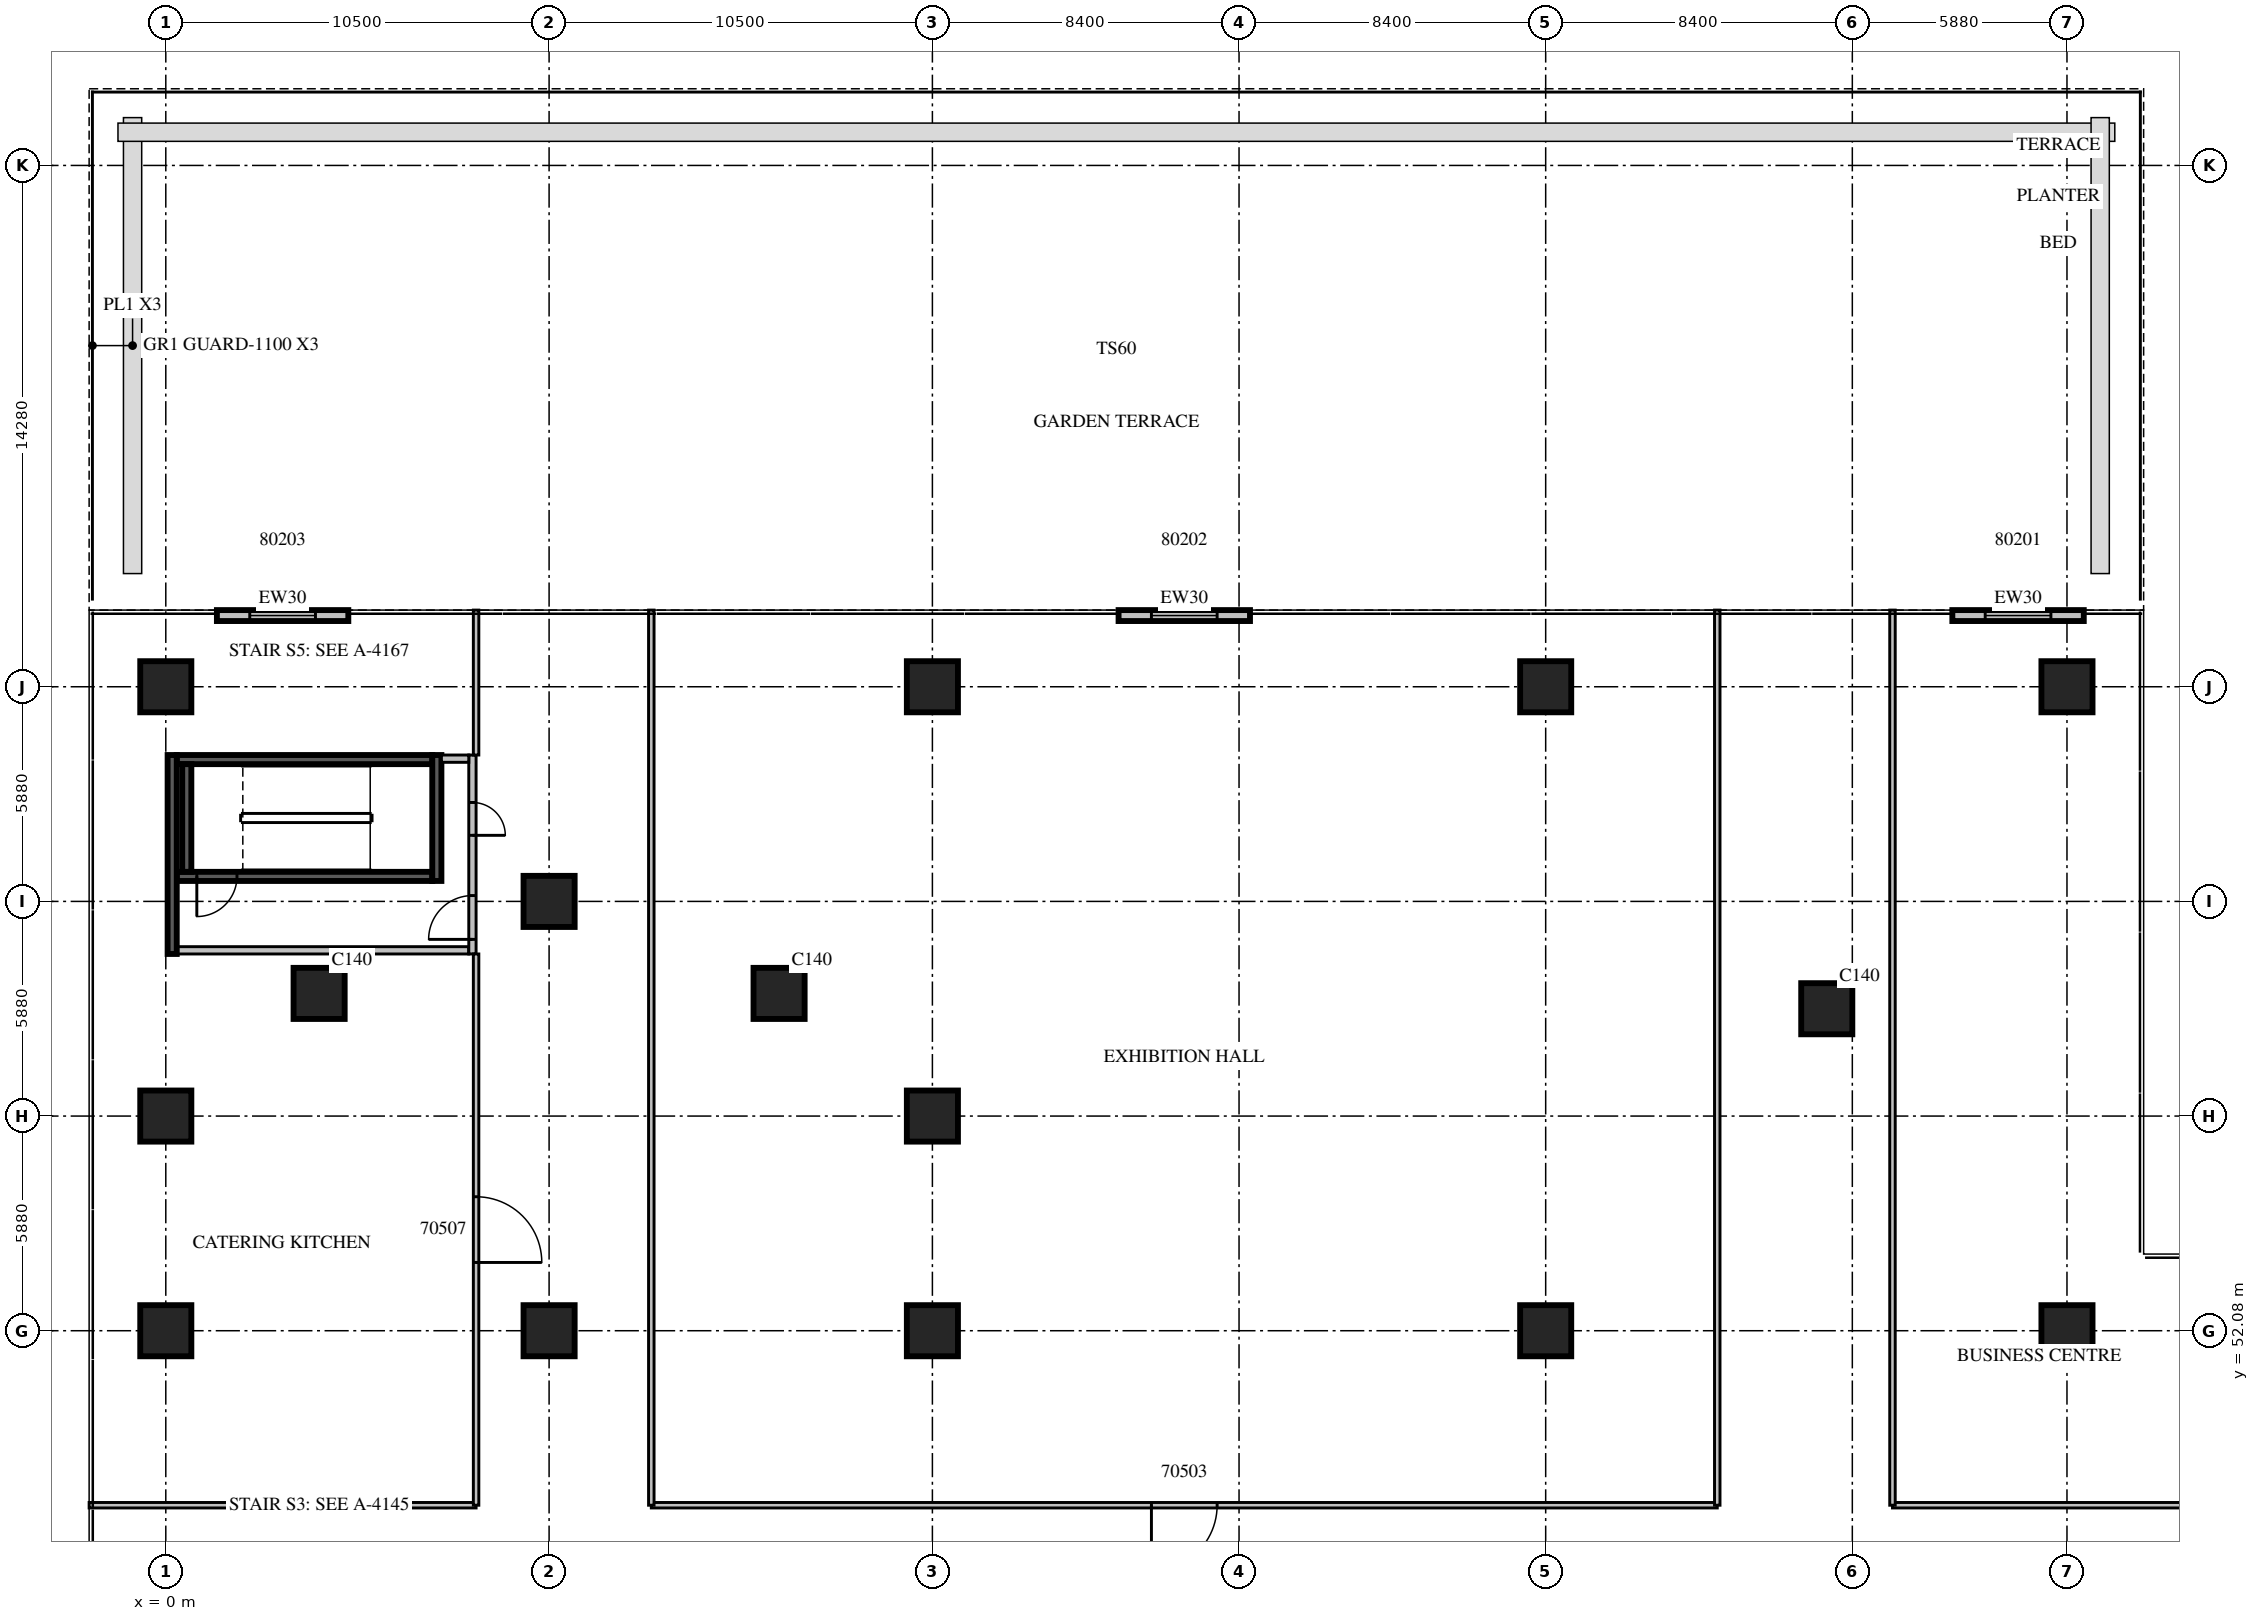
"""IFC4 building model, lengths in metres.
Left out: names, types, materials, properties, quantities, classifications, styles, units other than length and angle.
Written with IfcOpenShell. Run it as: python <this file> out.ifc"""

import sys

from ifc_helpers import new_model, si_unit, direction, frame, frame_2d, origin, origin_2d, place, context, subcontext, project, spatial, rectangle, extrude, source, transform, mapped, element, fill, save


model = new_model("IFC4")
c1 = context("Model", 3, precision=1e-05, world=origin(), true_north=direction((0.0, 1.0)))
c2 = subcontext(c1, "Body", "Model", "MODEL_VIEW")
j1 = project(units=[si_unit("LENGTHUNIT", "METRE"), si_unit("PLANEANGLEUNIT", "RADIAN")], contexts=[c1])
p1 = place(None, origin())
s1 = spatial("IfcSite", under=j1, at=p1, CompositionType="ELEMENT")
p2 = place(p1, origin())
s2 = spatial("IfcBuilding", under=s1, at=p2, CompositionType="ELEMENT")
p3 = place(p2, frame((0.0, 0.0, 12.9)))
s3 = spatial("IfcBuildingStorey", under=s2, at=p3, CompositionType="ELEMENT", Elevation=12.9)
m1 = source(origin(), c2, "Body", "SweptSolid", [
    extrude(rectangle(XDim=1.4, YDim=1.4, at=origin_2d()), origin(), (0.0, 0.0, 1.0), 5.4),
])
for number, where, z_axis, x_axis in (
    (1, (0.0, 52.08, 0.0), (0.0, 0.0, 1.0), (1.0, 0.0, 0.0)),
    (2, (0.0, 57.96, 0.0), (0.0, 0.0, 1.0), (1.0, 0.0, 0.0)),
    (3, (0.0, 69.72, 0.0), (0.0, 0.0, 1.0), (1.0, 0.0, 0.0)),
    (4, (4.2, 61.32, 0.0), (0.0, 0.0, 1.0), (1.0, 0.0, 0.0)),
    (5, (10.5, 52.08, 0.0), (0.0, 0.0, 1.0), (1.0, 0.0, 0.0)),
    (6, (10.5, 63.84, 0.0), (0.0, 0.0, 1.0), (1.0, 0.0, 0.0)),
    (7, (16.8, 61.32, 0.0), (0.0, 0.0, 1.0), (1.0, 0.0, 0.0)),
    (8, (21.0, 52.08, 0.0), (0.0, 0.0, 1.0), (1.0, 0.0, 0.0)),
    (9, (21.0, 57.96, 0.0), (0.0, 0.0, 1.0), (1.0, 0.0, 0.0)),
    (10, (21.0, 69.72, 0.0), (0.0, 0.0, 1.0), (1.0, 0.0, 0.0)),
    (11, (37.8, 52.08, 0.0), (0.0, 0.0, 1.0), (1.0, 0.0, 0.0)),
    (12, (37.8, 69.72, 0.0), (0.0, 0.0, 1.0), (1.0, 0.0, 0.0)),
    (13, (45.5, 60.9, 0.0), (0.0, 0.0, 1.0), (1.0, 0.0, 0.0)),
    (14, (52.08, 52.08, 0.0), (0.0, 0.0, 1.0), (1.0, 0.0, 0.0)),
    (15, (52.08, 69.72, 0.0), (0.0, 0.0, 1.0), (1.0, 0.0, 0.0)),
):
    element("IfcColumn", number, at=place(p3, frame(where, z_axis=z_axis, x_axis=x_axis)), inside=s3, PredefinedType="COLUMN", context=c2, shape_type="MappedRepresentation", body=[
        mapped(m1, transform((0.0, 0.0, 0.0), scale=1.0)),
    ])
p4 = place(p3, frame((52.54, 71.67, 0.0), z_axis=(0.0, 0.0, 1.0), x_axis=(-1.0, 0.0, 0.0)))
e16 = element("IfcWall", 16, at=p4, inside=s3, PredefinedType="STANDARD", context=c2, shape_type="SweptSolid", body=[
    extrude(rectangle(XDim=3.6, YDim=0.3, at=frame_2d((1.8, 0.0))), origin(), (0.0, 0.0, 1.0), 4.8),
])
m2 = source(origin(), c2, "Body", "SweptSolid", [
    extrude(rectangle(XDim=1.8, YDim=2.4, at=frame_2d((0.9, 1.2))), frame((0.0, 0.16, 0.0), z_axis=(0.0, -1.0, 0.0), x_axis=(1.0, 0.0, 0.0)), (0.0, 0.0, 1.0), 0.32),
])
p5 = place(p4, frame((0.9, 0.0, 0.0)))
e17 = element("IfcOpeningElement", 17, at=p5, cuts=e16, PredefinedType="OPENING", context=c2, shape_type="MappedRepresentation", body=[
    mapped(m2, transform((0.0, 0.0, 0.0), scale=1.0)),
])
m3 = source(origin(), c2, "Body", "SweptSolid", [
    extrude(rectangle(XDim=3.6, YDim=0.3, at=frame_2d((1.8, 0.0))), origin(), (0.0, 0.0, 1.0), 4.8),
])
p6 = place(p3, frame((29.7, 71.67, 0.0), z_axis=(0.0, 0.0, 1.0), x_axis=(-1.0, 0.0, 0.0)))
e18 = element("IfcWall", 18, at=p6, inside=s3, PredefinedType="STANDARD", context=c2, shape_type="MappedRepresentation", body=[
    mapped(m3, transform((0.0, 0.0, 0.0), scale=1.0)),
])
p7 = place(p6, frame((0.9, 0.0, 0.0)))
e19 = element("IfcOpeningElement", 19, at=p7, cuts=e18, PredefinedType="OPENING", context=c2, shape_type="MappedRepresentation", body=[
    mapped(m2, transform((0.0, 0.0, 0.0), scale=1.0)),
])
p8 = place(p3, frame((5.0, 71.67, 0.0), z_axis=(0.0, 0.0, 1.0), x_axis=(-1.0, 0.0, 0.0)))
e20 = element("IfcWall", 20, at=p8, inside=s3, PredefinedType="STANDARD", context=c2, shape_type="MappedRepresentation", body=[
    mapped(m3, transform((0.0, 0.0, 0.0), scale=1.0)),
])
p9 = place(p8, frame((0.9, 0.0, 0.0)))
e21 = element("IfcOpeningElement", 21, at=p9, cuts=e20, PredefinedType="OPENING", context=c2, shape_type="MappedRepresentation", body=[
    mapped(m2, transform((0.0, 0.0, 0.0), scale=1.0)),
])
m4 = source(origin(), c2, "Body", "SweptSolid", [
    extrude(rectangle(XDim=7.0, YDim=0.25, at=frame_2d((3.5, 0.0))), origin(), (0.0, 0.0, 1.0), 4.8),
])
p10 = place(p3, frame((0.3, 64.525, 0.0), z_axis=(0.0, 0.0, 1.0), x_axis=(1.0, 0.0, 0.0)))
e22 = element("IfcWall", 22, at=p10, inside=s3, PredefinedType="SOLIDWALL", context=c2, shape_type="MappedRepresentation", body=[
    mapped(m4, transform((0.0, 0.0, 0.0), scale=1.0)),
])
m5 = source(origin(), c2, "Body", "SweptSolid", [
    extrude(rectangle(XDim=1.1, YDim=2.1, at=frame_2d((0.55, 1.05))), frame((0.0, 0.135, 0.0), z_axis=(0.0, -1.0, 0.0), x_axis=(1.0, 0.0, 0.0)), (0.0, 0.0, 1.0), 0.27),
])
p11 = place(p10, frame((0.55, 0.0, 0.0)))
e23 = element("IfcOpeningElement", 23, at=p11, cuts=e22, PredefinedType="OPENING", context=c2, shape_type="MappedRepresentation", body=[
    mapped(m5, transform((0.0, 0.0, 0.0), scale=1.0)),
])
p12 = place(p3, frame((0.3, 67.725, 0.0), z_axis=(0.0, 0.0, 1.0), x_axis=(1.0, 0.0, 0.0)))
e24 = element("IfcWall", 24, at=p12, inside=s3, PredefinedType="SOLIDWALL", context=c2, shape_type="MappedRepresentation", body=[
    mapped(m4, transform((0.0, 0.0, 0.0), scale=1.0)),
])
m6 = source(origin(), c2, "Body", "SweptSolid", [
    extrude(rectangle(XDim=3.45, YDim=0.25, at=frame_2d((1.725, 0.0))), origin(), (0.0, 0.0, 1.0), 4.8),
])
p13 = place(p3, frame((7.425, 64.4, 0.0), z_axis=(0.0, 0.0, 1.0), x_axis=(0.0, 1.0, 0.0)))
e25 = element("IfcWall", 25, at=p13, inside=s3, PredefinedType="SOLIDWALL", context=c2, shape_type="MappedRepresentation", body=[
    mapped(m6, transform((0.0, 0.0, 0.0), scale=1.0)),
])
m7 = source(origin(), c2, "Body", "SweptSolid", [
    extrude(rectangle(XDim=2.95, YDim=0.25, at=frame_2d((1.475, 0.0))), origin(), (0.0, 0.0, 1.0), 4.8),
])
p14 = place(p3, frame((0.575, 64.65, 0.0), z_axis=(0.0, 0.0, 1.0), x_axis=(0.0, 1.0, 0.0)))
e26 = element("IfcWall", 26, at=p14, inside=s3, PredefinedType="SOLIDWALL", context=c2, shape_type="MappedRepresentation", body=[
    mapped(m7, transform((0.0, 0.0, 0.0), scale=1.0)),
])
m8 = source(origin(), c2, "Body", "SweptSolid", [
    extrude(rectangle(XDim=8.0, YDim=0.2, at=frame_2d((4.0, 0.0))), origin(), (0.0, 0.0, 1.0), 4.8),
])
p15 = place(p3, frame((0.3, 62.5, 0.0), z_axis=(0.0, 0.0, 1.0), x_axis=(1.0, 0.0, 0.0)))
e27 = element("IfcWall", 27, at=p15, inside=s3, PredefinedType="PARTITIONING", context=c2, shape_type="MappedRepresentation", body=[
    mapped(m8, transform((0.0, 0.0, 0.0), scale=1.0)),
])
m9 = source(origin(), c2, "Body", "SweptSolid", [
    extrude(rectangle(XDim=5.45, YDim=0.2, at=frame_2d((2.725, 0.0))), origin(), (0.0, 0.0, 1.0), 4.8),
])
p16 = place(p3, frame((8.4, 62.4, 0.0), z_axis=(0.0, 0.0, 1.0), x_axis=(0.0, 1.0, 0.0)))
e28 = element("IfcWall", 28, at=p16, inside=s3, PredefinedType="PARTITIONING", context=c2, shape_type="MappedRepresentation", body=[
    mapped(m9, transform((0.0, 0.0, 0.0), scale=1.0)),
])
m10 = source(origin(), c2, "Body", "SweptSolid", [
    extrude(rectangle(XDim=1.2, YDim=2.1, at=frame_2d((0.6, 1.05))), frame((0.0, 0.11, 0.0), z_axis=(0.0, -1.0, 0.0), x_axis=(1.0, 0.0, 0.0)), (0.0, 0.0, 1.0), 0.22),
])
p17 = place(p16, frame((0.4, 0.0, 0.0)))
e29 = element("IfcOpeningElement", 29, at=p17, cuts=e28, PredefinedType="OPENING", context=c2, shape_type="MappedRepresentation", body=[
    mapped(m10, transform((0.0, 0.0, 0.0), scale=1.0)),
])
m11 = source(origin(), c2, "Body", "SweptSolid", [
    extrude(rectangle(XDim=0.9, YDim=2.1, at=frame_2d((0.45, 1.05))), frame((0.0, 0.11, 0.0), z_axis=(0.0, -1.0, 0.0), x_axis=(1.0, 0.0, 0.0)), (0.0, 0.0, 1.0), 0.22),
])
p18 = place(p16, frame((3.25, 0.0, 0.0)))
e30 = element("IfcOpeningElement", 30, at=p18, cuts=e28, PredefinedType="OPENING", context=c2, shape_type="MappedRepresentation", body=[
    mapped(m11, transform((0.0, 0.0, 0.0), scale=1.0)),
])
m12 = source(origin(), c2, "Body", "SweptSolid", [
    extrude(rectangle(XDim=0.75, YDim=0.2, at=frame_2d((0.375, 0.0))), origin(), (0.0, 0.0, 1.0), 4.8),
])
p19 = place(p3, frame((7.55, 67.75, 0.0), z_axis=(0.0, 0.0, 1.0), x_axis=(1.0, 0.0, 0.0)))
e31 = element("IfcWall", 31, at=p19, inside=s3, PredefinedType="PARTITIONING", context=c2, shape_type="MappedRepresentation", body=[
    mapped(m12, transform((0.0, 0.0, 0.0), scale=1.0)),
])
m13 = source(origin(), c2, "Body", "SweptSolid", [
    extrude(rectangle(XDim=5.45, YDim=0.25, at=frame_2d((2.725, 0.0))), origin(), (0.0, 0.0, 1.0), 4.8),
])
p20 = place(p3, frame((0.175, 62.4, 0.0), z_axis=(0.0, 0.0, 1.0), x_axis=(0.0, 1.0, 0.0)))
e32 = element("IfcWall", 32, at=p20, inside=s3, PredefinedType="SOLIDWALL", context=c2, shape_type="MappedRepresentation", body=[
    mapped(m13, transform((0.0, 0.0, 0.0), scale=1.0)),
])
m14 = source(origin(), c2, "Body", "SweptSolid", [
    extrude(rectangle(XDim=10.6, YDim=0.15, at=frame_2d((5.3, 0.0))), origin(), (0.0, 0.0, 1.0), 4.8),
])
p21 = place(p3, frame((-2.1, 47.3, 0.0), z_axis=(0.0, 0.0, 1.0), x_axis=(1.0, 0.0, 0.0)))
e33 = element("IfcWall", 33, at=p21, inside=s3, PredefinedType="PARTITIONING", context=c2, shape_type="MappedRepresentation", body=[
    mapped(m14, transform((0.0, 0.0, 0.0), scale=1.0)),
])
m15 = source(origin(), c2, "Body", "SweptSolid", [
    extrude(rectangle(XDim=29.2, YDim=0.15, at=frame_2d((14.6, 0.0))), origin(), (0.0, 0.0, 1.0), 4.8),
])
p22 = place(p3, frame((13.3, 47.3, 0.0), z_axis=(0.0, 0.0, 1.0), x_axis=(1.0, 0.0, 0.0)))
e34 = element("IfcWall", 34, at=p22, inside=s3, PredefinedType="PARTITIONING", context=c2, shape_type="MappedRepresentation", body=[
    mapped(m15, transform((0.0, 0.0, 0.0), scale=1.0)),
])
m16 = source(origin(), c2, "Body", "SweptSolid", [
    extrude(rectangle(XDim=1.8, YDim=2.1, at=frame_2d((0.9, 1.05))), frame((0.0, 0.085, 0.0), z_axis=(0.0, -1.0, 0.0), x_axis=(1.0, 0.0, 0.0)), (0.0, 0.0, 1.0), 0.17),
])
p23 = place(p22, frame((13.7, 0.0, 0.0)))
e35 = element("IfcOpeningElement", 35, at=p23, cuts=e34, PredefinedType="OPENING", context=c2, shape_type="MappedRepresentation", body=[
    mapped(m16, transform((0.0, 0.0, 0.0), scale=1.0)),
])
m17 = source(origin(), c2, "Body", "SweptSolid", [
    extrude(rectangle(XDim=26.7, YDim=0.15, at=frame_2d((13.35, 0.0))), origin(), (0.0, 0.0, 1.0), 4.8),
])
p24 = place(p3, frame((47.3, 47.3, 0.0), z_axis=(0.0, 0.0, 1.0), x_axis=(1.0, 0.0, 0.0)))
e36 = element("IfcWall", 36, at=p24, inside=s3, PredefinedType="PARTITIONING", context=c2, shape_type="MappedRepresentation", body=[
    mapped(m17, transform((0.0, 0.0, 0.0), scale=1.0)),
])
p25 = place(p24, frame((12.45, 0.0, 0.0)))
e37 = element("IfcOpeningElement", 37, at=p25, cuts=e36, PredefinedType="OPENING", context=c2, shape_type="MappedRepresentation", body=[
    mapped(m16, transform((0.0, 0.0, 0.0), scale=1.0)),
])
m18 = source(origin(), c2, "Body", "SweptSolid", [
    extrude(rectangle(XDim=15.1, YDim=0.15, at=frame_2d((7.55, 0.0))), origin(), (0.0, 0.0, 1.0), 4.8),
])
p26 = place(p3, frame((8.5, 47.3, 0.0), z_axis=(0.0, 0.0, 1.0), x_axis=(0.0, 1.0, 0.0)))
e38 = element("IfcWall", 38, at=p26, inside=s3, PredefinedType="PARTITIONING", context=c2, shape_type="MappedRepresentation", body=[
    mapped(m18, transform((0.0, 0.0, 0.0), scale=1.0)),
])
p27 = place(p26, frame((6.65, 0.0, 0.0)))
e39 = element("IfcOpeningElement", 39, at=p27, cuts=e38, PredefinedType="OPENING", context=c2, shape_type="MappedRepresentation", body=[
    mapped(m16, transform((0.0, 0.0, 0.0), scale=1.0)),
])
p28 = place(p3, frame((8.5, 67.85, 0.0), z_axis=(0.0, 0.0, 1.0), x_axis=(0.0, 1.0, 0.0)))
e40 = element("IfcWall", 40, at=p28, inside=s3, PredefinedType="PARTITIONING", context=c2, shape_type="SweptSolid", body=[
    extrude(rectangle(XDim=3.97, YDim=0.15, at=frame_2d((1.985, 0.0))), origin(), (0.0, 0.0, 1.0), 4.8),
])
p29 = place(p3, frame((13.3, 47.3, 0.0), z_axis=(0.0, 0.0, 1.0), x_axis=(0.0, 1.0, 0.0)))
e41 = element("IfcWall", 41, at=p29, inside=s3, PredefinedType="PARTITIONING", context=c2, shape_type="SweptSolid", body=[
    extrude(rectangle(XDim=24.52, YDim=0.15, at=frame_2d((12.26, 0.0))), origin(), (0.0, 0.0, 1.0), 4.8),
])
m19 = source(origin(), c2, "Body", "SweptSolid", [
    extrude(rectangle(XDim=24.52, YDim=0.15, at=frame_2d((12.26, 0.0))), origin(), (0.0, 0.0, 1.0), 4.8),
])
for number, where, z_axis, x_axis in (
    (42, (42.5, 47.3, 0.0), (0.0, 0.0, 1.0), (0.0, 1.0, 0.0)),
    (43, (47.3, 47.3, 0.0), (0.0, 0.0, 1.0), (0.0, 1.0, 0.0)),
):
    element("IfcWall", number, at=place(p3, frame(where, z_axis=z_axis, x_axis=x_axis)), inside=s3, PredefinedType="PARTITIONING", context=c2, shape_type="MappedRepresentation", body=[
        mapped(m19, transform((0.0, 0.0, 0.0), scale=1.0)),
    ])
m20 = source(origin(), c2, "Body", "SweptSolid", [
    extrude(rectangle(XDim=1.8, YDim=2.4, at=frame_2d((0.9, 1.2))), frame((0.0, 0.025, 0.0), z_axis=(0.0, -1.0, 0.0), x_axis=(1.0, 0.0, 0.0)), (0.0, 0.0, 1.0), 0.05),
])
p30 = place(p5, origin())
e44 = element("IfcDoor", 44, at=p30, inside=s3, OperationType="SLIDING_TO_LEFT", PredefinedType="DOOR", context=c2, shape_type="MappedRepresentation", body=[
    mapped(m20, transform((0.0, 0.0, 0.0), scale=1.0)),
])
fill(e17, e44)
p31 = place(p7, origin())
e45 = element("IfcDoor", 45, at=p31, inside=s3, OperationType="SLIDING_TO_LEFT", PredefinedType="DOOR", context=c2, shape_type="MappedRepresentation", body=[
    mapped(m20, transform((0.0, 0.0, 0.0), scale=1.0)),
])
fill(e19, e45)
p32 = place(p9, origin())
e46 = element("IfcDoor", 46, at=p32, inside=s3, OperationType="SLIDING_TO_LEFT", PredefinedType="DOOR", context=c2, shape_type="MappedRepresentation", body=[
    mapped(m20, transform((0.0, 0.0, 0.0), scale=1.0)),
])
fill(e21, e46)
m21 = source(origin(), c2, "Body", "SweptSolid", [
    extrude(rectangle(XDim=1.1, YDim=2.1, at=frame_2d((0.55, 1.05))), frame((0.0, 0.025, 0.0), z_axis=(0.0, -1.0, 0.0), x_axis=(1.0, 0.0, 0.0)), (0.0, 0.0, 1.0), 0.05),
])
p33 = place(p11, origin())
e47 = element("IfcDoor", 47, at=p33, inside=s3, OperationType="SINGLE_SWING_RIGHT", PredefinedType="DOOR", context=c2, shape_type="MappedRepresentation", body=[
    mapped(m21, transform((0.0, 0.0, 0.0), scale=1.0)),
])
fill(e23, e47)
m22 = source(origin(), c2, "Body", "SweptSolid", [
    extrude(rectangle(XDim=1.2, YDim=2.1, at=frame_2d((0.6, 1.05))), frame((0.0, 0.025, 0.0), z_axis=(0.0, -1.0, 0.0), x_axis=(1.0, 0.0, 0.0)), (0.0, 0.0, 1.0), 0.05),
])
p34 = place(p17, origin())
e48 = element("IfcDoor", 48, at=p34, inside=s3, OperationType="SINGLE_SWING_LEFT", PredefinedType="DOOR", context=c2, shape_type="MappedRepresentation", body=[
    mapped(m22, transform((0.0, 0.0, 0.0), scale=1.0)),
])
fill(e29, e48)
m23 = source(origin(), c2, "Body", "SweptSolid", [
    extrude(rectangle(XDim=0.9, YDim=2.1, at=frame_2d((0.45, 1.05))), frame((0.0, 0.025, 0.0), z_axis=(0.0, -1.0, 0.0), x_axis=(1.0, 0.0, 0.0)), (0.0, 0.0, 1.0), 0.05),
])
p35 = place(p18, origin())
e49 = element("IfcDoor", 49, at=p35, inside=s3, OperationType="SINGLE_SWING_RIGHT", PredefinedType="DOOR", context=c2, shape_type="MappedRepresentation", body=[
    mapped(m23, transform((0.0, 0.0, 0.0), scale=1.0)),
])
fill(e30, e49)
m24 = source(origin(), c2, "Body", "SweptSolid", [
    extrude(rectangle(XDim=1.8, YDim=2.1, at=frame_2d((0.9, 1.05))), frame((0.0, 0.025, 0.0), z_axis=(0.0, -1.0, 0.0), x_axis=(1.0, 0.0, 0.0)), (0.0, 0.0, 1.0), 0.05),
])
p36 = place(p23, origin())
e50 = element("IfcDoor", 50, at=p36, inside=s3, OperationType="DOUBLE_DOOR_SINGLE_SWING", PredefinedType="DOOR", context=c2, shape_type="MappedRepresentation", body=[
    mapped(m24, transform((0.0, 0.0, 0.0), scale=1.0)),
])
fill(e35, e50)
p37 = place(p27, origin())
e51 = element("IfcDoor", 51, at=p37, inside=s3, OperationType="DOUBLE_DOOR_SINGLE_SWING", PredefinedType="DOOR", context=c2, shape_type="MappedRepresentation", body=[
    mapped(m24, transform((0.0, 0.0, 0.0), scale=1.0)),
])
fill(e39, e51)
save(model, sys.argv[1])
